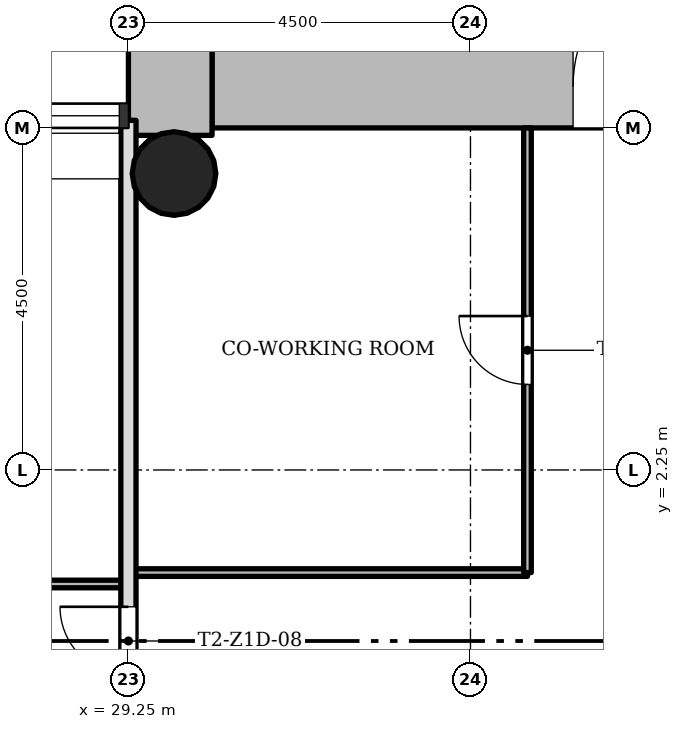
"""IFC4 building model, lengths in metres.
Left out: names, types, materials, properties, quantities, classifications, styles, units other than length and angle.
Written with IfcOpenShell. Run it as: python <this file> out.ifc"""

import sys

from ifc_helpers import new_model, si_unit, direction, frame, frame_2d, origin, origin_2d, place, context, subcontext, project, spatial, rectangle, hollow_circle, extrude, element, fill, save


model = new_model("IFC4")
c1 = context("Model", 3, precision=1e-05, world=origin(), true_north=direction((0.0, 1.0)))
c2 = subcontext(c1, "Body", "Model", "MODEL_VIEW")
j1 = project(units=[si_unit("LENGTHUNIT", "METRE"), si_unit("PLANEANGLEUNIT", "RADIAN")], contexts=[c1])
p1 = place(None, origin())
s1 = spatial("IfcSite", under=j1, at=p1, CompositionType="ELEMENT")
p2 = place(p1, origin())
s2 = spatial("IfcBuilding", under=s1, at=p2, CompositionType="ELEMENT")
p3 = place(p2, frame((0.0, 0.0, 58.5)))
s3 = spatial("IfcBuildingStorey", under=s2, at=p3, CompositionType="ELEMENT", Elevation=58.5)
p4 = place(p3, frame((30.35, 7.3, 0.0), z_axis=(0.0, 0.0, 1.0), x_axis=(1.0, 0.0, 0.0)))
e1 = element("IfcWall", 1, at=p4, inside=s3, PredefinedType="SHEAR", context=c2, shape_type="SweptSolid", body=[
    extrude(rectangle(XDim=12.4, YDim=1.1, at=frame_2d((6.2, 0.0))), origin(), (0.0, 0.0, 1.0), 3.4),
])
p5 = place(p4, frame((4.75, 0.0, 0.0)))
e2 = element("IfcOpeningElement", 2, at=p5, cuts=e1, PredefinedType="OPENING", context=c2, shape_type="SweptSolid", body=[
    extrude(rectangle(XDim=1.8, YDim=2.1, at=frame_2d((0.9, 1.05))), frame((0.0, 0.56, 0.0), z_axis=(0.0, -1.0, 0.0), x_axis=(1.0, 0.0, 0.0)), (0.0, 0.0, 1.0), 1.12),
])
p6 = place(p3, frame((29.8, 15.248, 0.0), z_axis=(0.0, 0.0, 1.0), x_axis=(0.0, -1.0, 0.0)))
e3 = element("IfcWall", 3, at=p6, inside=s3, PredefinedType="SHEAR", context=c2, shape_type="SweptSolid", body=[
    extrude(rectangle(XDim=8.596, YDim=1.1, at=frame_2d((4.298, 0.0))), origin(), (0.0, 0.0, 1.0), 3.4),
])
p7 = place(p3, frame((29.85, 6.15, 0.0), z_axis=(0.0, 0.0, 1.0), x_axis=(1.0, 0.0, 0.0)))
e4 = element("IfcColumn", 4, at=p7, inside=s3, PredefinedType="COLUMN", context=c2, shape_type="SweptSolid", body=[
    extrude(hollow_circle(Radius=0.55, WallThickness=0.04, at=origin_2d()), origin(), (0.0, 0.0, 1.0), 3.4),
])
p8 = place(p3, frame((29.25, 0.75, 0.0), z_axis=(0.0, 0.0, 1.0), x_axis=(-1.0, 0.0, 0.0)))
e5 = element("IfcWall", 5, at=p8, inside=s3, PredefinedType="PARTITIONING", context=c2, shape_type="SweptSolid", body=[
    extrude(rectangle(XDim=4.5, YDim=0.1, at=frame_2d((2.25, 0.0))), origin(), (0.0, 0.0, 1.0), 3.0),
])
p9 = place(p8, frame((1.8, 0.0, 0.0)))
e6 = element("IfcOpeningElement", 6, at=p9, cuts=e5, PredefinedType="OPENING", context=c2, shape_type="SweptSolid", body=[
    extrude(rectangle(XDim=0.9, YDim=2.1, at=frame_2d((0.45, 1.05))), frame((0.0, 0.06, 0.0), z_axis=(0.0, -1.0, 0.0), x_axis=(1.0, 0.0, 0.0)), (0.0, 0.0, 1.0), 0.12),
])
p10 = place(p3, frame((34.5, 0.9, 0.0), z_axis=(0.0, 0.0, 1.0), x_axis=(-1.0, 0.0, 0.0)))
e7 = element("IfcWall", 7, at=p10, inside=s3, PredefinedType="PARTITIONING", context=c2, shape_type="SweptSolid", body=[
    extrude(rectangle(XDim=5.25, YDim=0.1, at=frame_2d((2.625, 0.0))), origin(), (0.0, 0.0, 1.0), 3.0),
])
p11 = place(p3, frame((34.5, 0.9, 0.0), z_axis=(0.0, 0.0, 1.0), x_axis=(0.0, 1.0, 0.0)))
e8 = element("IfcWall", 8, at=p11, inside=s3, PredefinedType="PARTITIONING", context=c2, shape_type="SweptSolid", body=[
    extrude(rectangle(XDim=5.85, YDim=0.1, at=frame_2d((2.925, 0.0))), origin(), (0.0, 0.0, 1.0), 3.0),
])
p12 = place(p11, frame((2.475, 0.0, 0.0)))
e9 = element("IfcOpeningElement", 9, at=p12, cuts=e8, PredefinedType="OPENING", context=c2, shape_type="SweptSolid", body=[
    extrude(rectangle(XDim=0.9, YDim=2.1, at=frame_2d((0.45, 1.05))), frame((0.0, 0.06, 0.0), z_axis=(0.0, -1.0, 0.0), x_axis=(1.0, 0.0, 0.0)), (0.0, 0.0, 1.0), 0.12),
])
p13 = place(p3, frame((29.25, -6.85, 0.0), z_axis=(0.0, 0.0, 1.0), x_axis=(0.0, 1.0, 0.0)))
e10 = element("IfcWall", 10, at=p13, inside=s3, PredefinedType="SOLIDWALL", context=c2, shape_type="SweptSolid", body=[
    extrude(rectangle(XDim=13.7, YDim=0.2, at=frame_2d((6.85, 0.0))), origin(), (0.0, 0.0, 1.0), 3.0),
])
p14 = place(p13, frame((6.4, 0.0, 0.0)))
e11 = element("IfcOpeningElement", 11, at=p14, cuts=e10, PredefinedType="OPENING", context=c2, shape_type="SweptSolid", body=[
    extrude(rectangle(XDim=0.9, YDim=2.1, at=frame_2d((0.45, 1.05))), frame((0.0, 0.11, 0.0), z_axis=(0.0, -1.0, 0.0), x_axis=(1.0, 0.0, 0.0)), (0.0, 0.0, 1.0), 0.22),
])
p15 = place(p12, origin())
e12 = element("IfcDoor", 12, at=p15, inside=s3, OperationType="SINGLE_SWING_LEFT", PredefinedType="DOOR", context=c2, shape_type="SweptSolid", body=[
    extrude(rectangle(XDim=0.9, YDim=2.1, at=frame_2d((0.45, 1.05))), frame((0.0, 0.025, 0.0), z_axis=(0.0, -1.0, 0.0), x_axis=(1.0, 0.0, 0.0)), (0.0, 0.0, 1.0), 0.05),
])
fill(e9, e12)
p16 = place(p14, origin())
e13 = element("IfcDoor", 13, at=p16, inside=s3, OperationType="SINGLE_SWING_LEFT", PredefinedType="DOOR", context=c2, shape_type="SweptSolid", body=[
    extrude(rectangle(XDim=0.9, YDim=2.1, at=frame_2d((0.45, 1.05))), frame((0.0, 0.025, 0.0), z_axis=(0.0, -1.0, 0.0), x_axis=(1.0, 0.0, 0.0)), (0.0, 0.0, 1.0), 0.05),
])
fill(e11, e13)
p17 = place(p5, origin())
e14 = element("IfcDoor", 14, at=p17, inside=s3, OperationType="SINGLE_SWING_LEFT", PredefinedType="DOOR", context=c2, shape_type="SweptSolid", body=[
    extrude(rectangle(XDim=1.8, YDim=2.1, at=frame_2d((0.9, 1.05))), frame((0.0, 0.025, 0.0), z_axis=(0.0, -1.0, 0.0), x_axis=(1.0, 0.0, 0.0)), (0.0, 0.0, 1.0), 0.05),
])
fill(e2, e14)
save(model, sys.argv[1])
